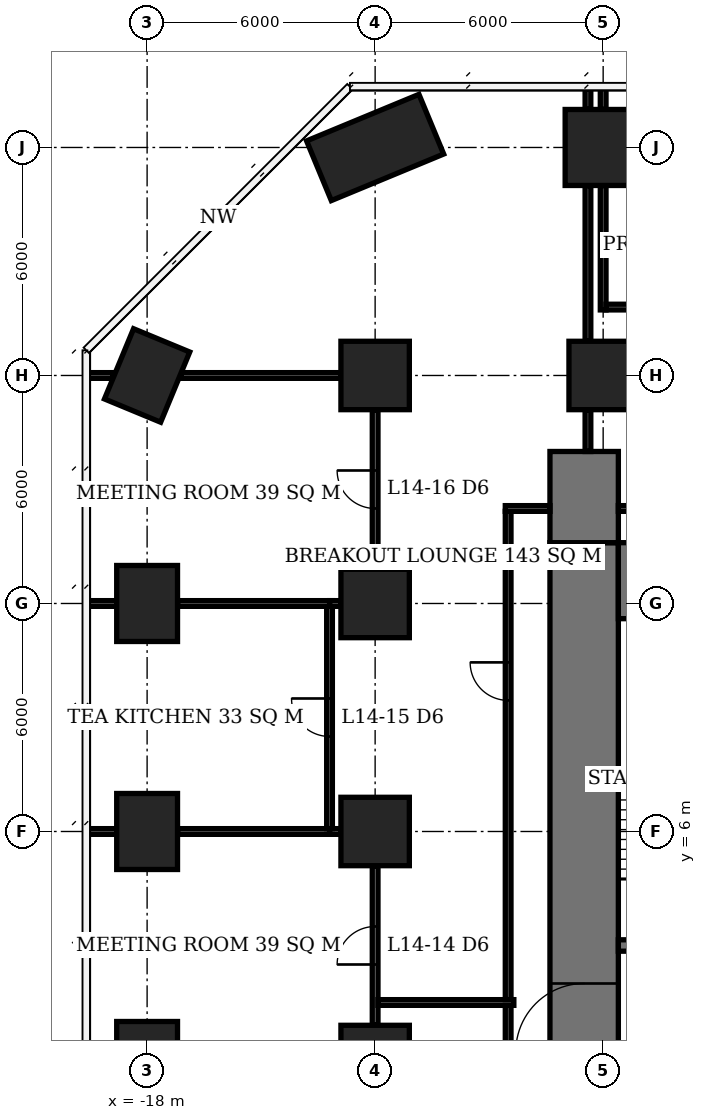
"""IFC4 building model, lengths in metres.
Left out: names, types, materials, properties, quantities, classifications, styles, units other than length and angle.
Written with IfcOpenShell. Run it as: python <this file> out.ifc"""

import sys

from ifc_helpers import new_model, si_unit, direction, frame, frame_2d, origin, origin_2d, place, context, subcontext, project, spatial, rectangle, extrude, element, fill, save


model = new_model("IFC4")
c1 = context("Model", 3, precision=1e-05, world=origin(), true_north=direction((0.0, 1.0)))
c2 = subcontext(c1, "Body", "Model", "MODEL_VIEW")
j1 = project(units=[si_unit("LENGTHUNIT", "METRE"), si_unit("PLANEANGLEUNIT", "RADIAN")], contexts=[c1])
p1 = place(None, origin())
s1 = spatial("IfcSite", under=j1, at=p1, CompositionType="ELEMENT")
p2 = place(p1, origin())
s2 = spatial("IfcBuilding", under=s1, at=p2, CompositionType="ELEMENT")
p3 = place(p2, frame((0.0, 0.0, 61.1)))
s3 = spatial("IfcBuildingStorey", under=s2, at=p3, CompositionType="ELEMENT", Elevation=61.1)
for number, where, z_axis, x_axis in (
    (1, (-18.0, 0.0, 0.0), (0.0, 0.0, 1.0), (0.0, 1.0, 0.0)),
    (2, (-18.0, 6.0, 0.0), (0.0, 0.0, 1.0), (0.0, 1.0, 0.0)),
    (3, (-18.0, 12.0, 0.0), (0.0, 0.0, 1.0), (0.0, 1.0, 0.0)),
    (4, (-18.0, 18.0, 0.0), (0.0, 0.0, 1.0), (0.383, 0.924, 0.0)),
):
    element("IfcColumn", number, at=place(p3, frame(where, z_axis=z_axis, x_axis=x_axis)), inside=s3, PredefinedType="COLUMN", context=c2, shape_type="SweptSolid", body=[
        extrude(rectangle(XDim=2.0, YDim=1.6, at=origin_2d()), origin(), (0.0, 0.0, 1.0), 3.9),
    ])
for number, where, z_axis, x_axis in (
    (5, (-12.0, 0.0, 0.0), (0.0, 0.0, 1.0), (1.0, 0.0, 0.0)),
    (6, (-12.0, 6.0, 0.0), (0.0, 0.0, 1.0), (1.0, 0.0, 0.0)),
    (7, (-12.0, 12.0, 0.0), (0.0, 0.0, 1.0), (1.0, 0.0, 0.0)),
    (8, (-12.0, 18.0, 0.0), (0.0, 0.0, 1.0), (1.0, 0.0, 0.0)),
):
    element("IfcColumn", number, at=place(p3, frame(where, z_axis=z_axis, x_axis=x_axis)), inside=s3, PredefinedType="COLUMN", context=c2, shape_type="SweptSolid", body=[
        extrude(rectangle(XDim=1.8, YDim=1.8, at=origin_2d()), origin(), (0.0, 0.0, 1.0), 3.9),
    ])
p4 = place(p3, frame((-12.0, 24.0, 0.0), z_axis=(0.0, 0.0, 1.0), x_axis=(0.923879532511, 0.382683432365, 0.0)))
e9 = element("IfcColumn", 9, at=p4, inside=s3, PredefinedType="COLUMN", context=c2, shape_type="SweptSolid", body=[
    extrude(rectangle(XDim=3.2, YDim=1.7, at=origin_2d()), origin(), (0.0, 0.0, 1.0), 3.9),
])
p5 = place(p3, frame((-6.0, 18.0, 0.0), z_axis=(0.0, 0.0, 1.0), x_axis=(1.0, 0.0, 0.0)))
e10 = element("IfcColumn", 10, at=p5, inside=s3, PredefinedType="COLUMN", context=c2, shape_type="SweptSolid", body=[
    extrude(rectangle(XDim=1.8, YDim=1.8, at=origin_2d()), origin(), (0.0, 0.0, 1.0), 3.9),
])
p6 = place(p3, frame((-6.0, 24.0, 0.0), z_axis=(0.0, 0.0, 1.0), x_axis=(1.0, 0.0, 0.0)))
e11 = element("IfcColumn", 11, at=p6, inside=s3, PredefinedType="COLUMN", context=c2, shape_type="SweptSolid", body=[
    extrude(rectangle(XDim=2.0, YDim=2.0, at=origin_2d()), origin(), (0.0, 0.0, 1.0), 3.9),
])
p7 = place(p3, frame((-5.6, 12.6, 0.0), z_axis=(0.0, 0.0, 1.0), x_axis=(1.0, 0.0, 0.0)))
e12 = element("IfcWall", 12, at=p7, inside=s3, PredefinedType="SHEAR", context=c2, shape_type="SweptSolid", body=[
    extrude(rectangle(XDim=23.2, YDim=2.0, at=frame_2d((11.6, 0.0))), origin(), (0.0, 0.0, 1.0), 3.9),
])
p8 = place(p3, frame((-6.5, -7.6, 0.0), z_axis=(0.0, 0.0, 1.0), x_axis=(0.0, 1.0, 0.0)))
e13 = element("IfcWall", 13, at=p8, inside=s3, PredefinedType="SHEAR", context=c2, shape_type="SweptSolid", body=[
    extrude(rectangle(XDim=21.2, YDim=1.8, at=frame_2d((10.6, 0.0))), origin(), (0.0, 0.0, 1.0), 3.9),
])
p9 = place(p8, frame((7.8, 0.0, 0.0)))
e14 = element("IfcOpeningElement", 14, at=p9, cuts=e13, PredefinedType="OPENING", context=c2, shape_type="SweptSolid", body=[
    extrude(rectangle(XDim=1.8, YDim=2.4, at=frame_2d((0.9, 1.2))), frame((0.0, 0.91, 0.0), z_axis=(0.0, -1.0, 0.0), x_axis=(1.0, 0.0, 0.0)), (0.0, 0.0, 1.0), 1.82),
])
p10 = place(p3, frame((-6.5, 13.6, 0.0), z_axis=(0.0, 0.0, 1.0), x_axis=(0.0, 1.0, 0.0)))
e15 = element("IfcWall", 15, at=p10, inside=s3, PredefinedType="SHEAR", context=c2, shape_type="SweptSolid", body=[
    extrude(rectangle(XDim=2.4, YDim=1.8, at=frame_2d((1.2, 0.0))), origin(), (0.0, 0.0, 1.0), 3.9),
])
p11 = place(p3, frame((-5.6, 3.0, 0.0), z_axis=(0.0, 0.0, 1.0), x_axis=(1.0, 0.0, 0.0)))
e16 = element("IfcWall", 16, at=p11, inside=s3, PredefinedType="SHEAR", context=c2, shape_type="SweptSolid", body=[
    extrude(rectangle(XDim=5.45, YDim=0.3, at=frame_2d((2.725, 0.0))), origin(), (0.0, 0.0, 1.0), 3.9),
])
p12 = place(p11, frame((0.4, 0.0, 0.0)))
e17 = element("IfcOpeningElement", 17, at=p12, cuts=e16, PredefinedType="OPENING", context=c2, shape_type="SweptSolid", body=[
    extrude(rectangle(XDim=1.2, YDim=2.1, at=frame_2d((0.6, 1.05))), frame((0.0, 0.16, 0.0), z_axis=(0.0, -1.0, 0.0), x_axis=(1.0, 0.0, 0.0)), (0.0, 0.0, 1.0), 0.32),
])
p13 = place(p11, frame((3.95, 0.0, 0.0)))
e18 = element("IfcOpeningElement", 18, at=p13, cuts=e16, PredefinedType="OPENING", context=c2, shape_type="SweptSolid", body=[
    extrude(rectangle(XDim=0.9, YDim=2.1, at=frame_2d((0.45, 1.05))), frame((0.0, 0.16, 0.0), z_axis=(0.0, -1.0, 0.0), x_axis=(1.0, 0.0, 0.0)), (0.0, 0.0, 1.0), 0.32),
])
p14 = place(p3, frame((-19.6, 6.0, 0.0), z_axis=(0.0, 0.0, 1.0), x_axis=(1.0, 0.0, 0.0)))
e19 = element("IfcWall", 19, at=p14, inside=s3, PredefinedType="PARTITIONING", context=c2, shape_type="SweptSolid", body=[
    extrude(rectangle(XDim=0.8, YDim=0.15, at=frame_2d((0.4, 0.0))), origin(), (0.0, 0.0, 1.0), 3.65),
])
p15 = place(p3, frame((-17.2, 6.0, 0.0), z_axis=(0.0, 0.0, 1.0), x_axis=(1.0, 0.0, 0.0)))
e20 = element("IfcWall", 20, at=p15, inside=s3, PredefinedType="PARTITIONING", context=c2, shape_type="SweptSolid", body=[
    extrude(rectangle(XDim=4.075, YDim=0.15, at=frame_2d((2.038, 0.0))), origin(), (0.0, 0.0, 1.0), 3.65),
])
p16 = place(p3, frame((-13.2, 6.0, 0.0), z_axis=(0.0, 0.0, 1.0), x_axis=(1.0, 0.0, 0.0)))
e21 = element("IfcWall", 21, at=p16, inside=s3, PredefinedType="PARTITIONING", context=c2, shape_type="SweptSolid", body=[
    extrude(rectangle(XDim=0.3, YDim=0.15, at=frame_2d((0.15, 0.0))), origin(), (0.0, 0.0, 1.0), 3.65),
])
p17 = place(p3, frame((-19.6, 12.0, 0.0), z_axis=(0.0, 0.0, 1.0), x_axis=(1.0, 0.0, 0.0)))
e22 = element("IfcWall", 22, at=p17, inside=s3, PredefinedType="PARTITIONING", context=c2, shape_type="SweptSolid", body=[
    extrude(rectangle(XDim=0.8, YDim=0.15, at=frame_2d((0.4, 0.0))), origin(), (0.0, 0.0, 1.0), 3.65),
])
p18 = place(p3, frame((-17.2, 12.0, 0.0), z_axis=(0.0, 0.0, 1.0), x_axis=(1.0, 0.0, 0.0)))
e23 = element("IfcWall", 23, at=p18, inside=s3, PredefinedType="PARTITIONING", context=c2, shape_type="SweptSolid", body=[
    extrude(rectangle(XDim=4.075, YDim=0.15, at=frame_2d((2.038, 0.0))), origin(), (0.0, 0.0, 1.0), 3.65),
])
p19 = place(p3, frame((-13.2, 12.0, 0.0), z_axis=(0.0, 0.0, 1.0), x_axis=(1.0, 0.0, 0.0)))
e24 = element("IfcWall", 24, at=p19, inside=s3, PredefinedType="PARTITIONING", context=c2, shape_type="SweptSolid", body=[
    extrude(rectangle(XDim=0.3, YDim=0.15, at=frame_2d((0.15, 0.0))), origin(), (0.0, 0.0, 1.0), 3.65),
])
p20 = place(p3, frame((-19.6, 18.0, 0.0), z_axis=(0.0, 0.0, 1.0), x_axis=(1.0, 0.0, 0.0)))
e25 = element("IfcWall", 25, at=p20, inside=s3, PredefinedType="PARTITIONING", context=c2, shape_type="SweptSolid", body=[
    extrude(rectangle(XDim=0.703, YDim=0.15, at=frame_2d((0.352, 0.0))), origin(), (0.0, 0.0, 1.0), 3.65),
])
p21 = place(p3, frame((-17.103, 18.0, 0.0), z_axis=(0.0, 0.0, 1.0), x_axis=(1.0, 0.0, 0.0)))
e26 = element("IfcWall", 26, at=p21, inside=s3, PredefinedType="PARTITIONING", context=c2, shape_type="SweptSolid", body=[
    extrude(rectangle(XDim=4.203, YDim=0.15, at=frame_2d((2.102, 0.0))), origin(), (0.0, 0.0, 1.0), 3.65),
])
p22 = place(p3, frame((-5.925, 19.8, 0.0), z_axis=(0.0, 0.0, 1.0), x_axis=(1.0, 0.0, 0.0)))
e27 = element("IfcWall", 27, at=p22, inside=s3, PredefinedType="PARTITIONING", context=c2, shape_type="SweptSolid", body=[
    extrude(rectangle(XDim=5.85, YDim=0.15, at=frame_2d((2.925, 0.0))), origin(), (0.0, 0.0, 1.0), 3.65),
])
p23 = place(p22, frame((2.425, 0.0, 0.0)))
e28 = element("IfcOpeningElement", 28, at=p23, cuts=e27, PredefinedType="OPENING", context=c2, shape_type="SweptSolid", body=[
    extrude(rectangle(XDim=1.0, YDim=2.1, at=frame_2d((0.5, 1.05))), frame((0.0, 0.085, 0.0), z_axis=(0.0, -1.0, 0.0), x_axis=(1.0, 0.0, 0.0)), (0.0, 0.0, 1.0), 0.17),
])
p24 = place(p3, frame((-13.2, 6.075, 0.0), z_axis=(0.0, 0.0, 1.0), x_axis=(0.0, 1.0, 0.0)))
e29 = element("IfcWall", 29, at=p24, inside=s3, PredefinedType="PARTITIONING", context=c2, shape_type="SweptSolid", body=[
    extrude(rectangle(XDim=5.85, YDim=0.15, at=frame_2d((2.925, 0.0))), origin(), (0.0, 0.0, 1.0), 3.65),
])
p25 = place(p24, frame((2.425, 0.0, 0.0)))
e30 = element("IfcOpeningElement", 30, at=p25, cuts=e29, PredefinedType="OPENING", context=c2, shape_type="SweptSolid", body=[
    extrude(rectangle(XDim=1.0, YDim=2.1, at=frame_2d((0.5, 1.05))), frame((0.0, 0.085, 0.0), z_axis=(0.0, -1.0, 0.0), x_axis=(1.0, 0.0, 0.0)), (0.0, 0.0, 1.0), 0.17),
])
p26 = place(p3, frame((-12.0, 0.9, 0.0), z_axis=(0.0, 0.0, 1.0), x_axis=(0.0, 1.0, 0.0)))
e31 = element("IfcWall", 31, at=p26, inside=s3, PredefinedType="PARTITIONING", context=c2, shape_type="SweptSolid", body=[
    extrude(rectangle(XDim=4.2, YDim=0.15, at=frame_2d((2.1, 0.0))), origin(), (0.0, 0.0, 1.0), 3.65),
])
p27 = place(p26, frame((1.6, 0.0, 0.0)))
e32 = element("IfcOpeningElement", 32, at=p27, cuts=e31, PredefinedType="OPENING", context=c2, shape_type="SweptSolid", body=[
    extrude(rectangle(XDim=1.0, YDim=2.1, at=frame_2d((0.5, 1.05))), frame((0.0, 0.085, 0.0), z_axis=(0.0, -1.0, 0.0), x_axis=(1.0, 0.0, 0.0)), (0.0, 0.0, 1.0), 0.17),
])
p28 = place(p3, frame((-12.0, 12.9, 0.0), z_axis=(0.0, 0.0, 1.0), x_axis=(0.0, 1.0, 0.0)))
e33 = element("IfcWall", 33, at=p28, inside=s3, PredefinedType="PARTITIONING", context=c2, shape_type="SweptSolid", body=[
    extrude(rectangle(XDim=4.2, YDim=0.15, at=frame_2d((2.1, 0.0))), origin(), (0.0, 0.0, 1.0), 3.65),
])
p29 = place(p28, frame((1.6, 0.0, 0.0)))
e34 = element("IfcOpeningElement", 34, at=p29, cuts=e33, PredefinedType="OPENING", context=c2, shape_type="SweptSolid", body=[
    extrude(rectangle(XDim=1.0, YDim=2.1, at=frame_2d((0.5, 1.05))), frame((0.0, 0.085, 0.0), z_axis=(0.0, -1.0, 0.0), x_axis=(1.0, 0.0, 0.0)), (0.0, 0.0, 1.0), 0.17),
])
p30 = place(p3, frame((-6.0, 19.725, 0.0), z_axis=(0.0, 0.0, 1.0), x_axis=(0.0, 1.0, 0.0)))
e35 = element("IfcWall", 35, at=p30, inside=s3, PredefinedType="PARTITIONING", context=c2, shape_type="SweptSolid", body=[
    extrude(rectangle(XDim=3.275, YDim=0.15, at=frame_2d((1.637, 0.0))), origin(), (0.0, 0.0, 1.0), 3.65),
])
p31 = place(p3, frame((-6.0, 25.0, 0.0), z_axis=(0.0, 0.0, 1.0), x_axis=(0.0, 1.0, 0.0)))
e36 = element("IfcWall", 36, at=p31, inside=s3, PredefinedType="PARTITIONING", context=c2, shape_type="SweptSolid", body=[
    extrude(rectangle(XDim=0.6, YDim=0.15, at=frame_2d((0.3, 0.0))), origin(), (0.0, 0.0, 1.0), 2.65),
])
p32 = place(p3, frame((-11.925, 1.5, 0.0), z_axis=(0.0, 0.0, 1.0), x_axis=(1.0, 0.0, 0.0)))
e37 = element("IfcWall", 37, at=p32, inside=s3, PredefinedType="PARTITIONING", context=c2, shape_type="SweptSolid", body=[
    extrude(rectangle(XDim=3.575, YDim=0.15, at=frame_2d((1.788, 0.0))), origin(), (0.0, 0.0, 1.0), 3.65),
])
p33 = place(p3, frame((-8.5, -8.425, 0.0), z_axis=(0.0, 0.0, 1.0), x_axis=(0.0, 1.0, 0.0)))
e38 = element("IfcWall", 38, at=p33, inside=s3, PredefinedType="PARTITIONING", context=c2, shape_type="SweptSolid", body=[
    extrude(rectangle(XDim=9.85, YDim=0.15, at=frame_2d((4.925, 0.0))), origin(), (0.0, 0.0, 1.0), 3.65),
])
p34 = place(p33, frame((2.925, 0.0, 0.0)))
e39 = element("IfcOpeningElement", 39, at=p34, cuts=e38, PredefinedType="OPENING", context=c2, shape_type="SweptSolid", body=[
    extrude(rectangle(XDim=1.0, YDim=2.1, at=frame_2d((0.5, 1.05))), frame((0.0, 0.085, 0.0), z_axis=(0.0, -1.0, 0.0), x_axis=(1.0, 0.0, 0.0)), (0.0, 0.0, 1.0), 0.17),
])
p35 = place(p3, frame((-8.5, 1.575, 0.0), z_axis=(0.0, 0.0, 1.0), x_axis=(0.0, 1.0, 0.0)))
e40 = element("IfcWall", 40, at=p35, inside=s3, PredefinedType="PARTITIONING", context=c2, shape_type="SweptSolid", body=[
    extrude(rectangle(XDim=12.85, YDim=0.15, at=frame_2d((6.425, 0.0))), origin(), (0.0, 0.0, 1.0), 3.65),
])
p36 = place(p35, frame((7.875, 0.0, 0.0)))
e41 = element("IfcOpeningElement", 41, at=p36, cuts=e40, PredefinedType="OPENING", context=c2, shape_type="SweptSolid", body=[
    extrude(rectangle(XDim=1.0, YDim=2.1, at=frame_2d((0.5, 1.05))), frame((0.0, 0.085, 0.0), z_axis=(0.0, -1.0, 0.0), x_axis=(1.0, 0.0, 0.0)), (0.0, 0.0, 1.0), 0.17),
])
p37 = place(p3, frame((-8.575, 14.5, 0.0), z_axis=(0.0, 0.0, 1.0), x_axis=(1.0, 0.0, 0.0)))
e42 = element("IfcWall", 42, at=p37, inside=s3, PredefinedType="PARTITIONING", context=c2, shape_type="SweptSolid", body=[
    extrude(rectangle(XDim=1.175, YDim=0.15, at=frame_2d((0.587, 0.0))), origin(), (0.0, 0.0, 1.0), 3.65),
])
p38 = place(p3, frame((-6.4, 16.0, 0.0), z_axis=(0.0, 0.0, 1.0), x_axis=(0.0, 1.0, 0.0)))
e43 = element("IfcWall", 43, at=p38, inside=s3, PredefinedType="PARTITIONING", context=c2, shape_type="SweptSolid", body=[
    extrude(rectangle(XDim=1.1, YDim=0.15, at=frame_2d((0.55, 0.0))), origin(), (0.0, 0.0, 1.0), 3.65),
])
p39 = place(p3, frame((-6.4, 18.9, 0.0), z_axis=(0.0, 0.0, 1.0), x_axis=(0.0, 1.0, 0.0)))
e44 = element("IfcWall", 44, at=p39, inside=s3, PredefinedType="PARTITIONING", context=c2, shape_type="SweptSolid", body=[
    extrude(rectangle(XDim=4.1, YDim=0.15, at=frame_2d((2.05, 0.0))), origin(), (0.0, 0.0, 1.0), 3.65),
])
p40 = place(p3, frame((-6.4, 25.0, 0.0), z_axis=(0.0, 0.0, 1.0), x_axis=(0.0, 1.0, 0.0)))
e45 = element("IfcWall", 45, at=p40, inside=s3, PredefinedType="PARTITIONING", context=c2, shape_type="SweptSolid", body=[
    extrude(rectangle(XDim=0.55, YDim=0.15, at=frame_2d((0.275, 0.0))), origin(), (0.0, 0.0, 1.0), 2.65),
])
p41 = place(p3, frame((-5.6, 14.5, 0.0), z_axis=(0.0, 0.0, 1.0), x_axis=(1.0, 0.0, 0.0)))
e46 = element("IfcWall", 46, at=p41, inside=s3, PredefinedType="PARTITIONING", context=c2, shape_type="SweptSolid", body=[
    extrude(rectangle(XDim=23.2, YDim=0.15, at=frame_2d((11.6, 0.0))), origin(), (0.0, 0.0, 1.0), 3.65),
])
p42 = place(p41, frame((14.58, 0.0, 0.0)))
e47 = element("IfcOpeningElement", 47, at=p42, cuts=e46, PredefinedType="OPENING", context=c2, shape_type="SweptSolid", body=[
    extrude(rectangle(XDim=1.0, YDim=2.1, at=frame_2d((0.5, 1.05))), frame((0.0, 0.085, 0.0), z_axis=(0.0, -1.0, 0.0), x_axis=(1.0, 0.0, 0.0)), (0.0, 0.0, 1.0), 0.17),
])
p43 = place(p9, origin())
e48 = element("IfcDoor", 48, at=p43, inside=s3, OperationType="DOUBLE_DOOR_SINGLE_SWING", PredefinedType="DOOR", context=c2, shape_type="SweptSolid", body=[
    extrude(rectangle(XDim=1.8, YDim=2.4, at=frame_2d((0.9, 1.2))), frame((0.0, 0.025, 0.0), z_axis=(0.0, -1.0, 0.0), x_axis=(1.0, 0.0, 0.0)), (0.0, 0.0, 1.0), 0.05),
])
fill(e14, e48)
p44 = place(p27, origin())
e49 = element("IfcDoor", 49, at=p44, inside=s3, OperationType="SINGLE_SWING_LEFT", PredefinedType="DOOR", context=c2, shape_type="SweptSolid", body=[
    extrude(rectangle(XDim=1.0, YDim=2.1, at=frame_2d((0.5, 1.05))), frame((0.0, 0.025, 0.0), z_axis=(0.0, -1.0, 0.0), x_axis=(1.0, 0.0, 0.0)), (0.0, 0.0, 1.0), 0.05),
])
fill(e32, e49)
p45 = place(p25, origin())
e50 = element("IfcDoor", 50, at=p45, inside=s3, OperationType="SINGLE_SWING_RIGHT", PredefinedType="DOOR", context=c2, shape_type="SweptSolid", body=[
    extrude(rectangle(XDim=1.0, YDim=2.1, at=frame_2d((0.5, 1.05))), frame((0.0, 0.025, 0.0), z_axis=(0.0, -1.0, 0.0), x_axis=(1.0, 0.0, 0.0)), (0.0, 0.0, 1.0), 0.05),
])
fill(e30, e50)
p46 = place(p29, origin())
e51 = element("IfcDoor", 51, at=p46, inside=s3, OperationType="SINGLE_SWING_RIGHT", PredefinedType="DOOR", context=c2, shape_type="SweptSolid", body=[
    extrude(rectangle(XDim=1.0, YDim=2.1, at=frame_2d((0.5, 1.05))), frame((0.0, 0.025, 0.0), z_axis=(0.0, -1.0, 0.0), x_axis=(1.0, 0.0, 0.0)), (0.0, 0.0, 1.0), 0.05),
])
fill(e34, e51)
p47 = place(p36, origin())
e52 = element("IfcDoor", 52, at=p47, inside=s3, OperationType="SINGLE_SWING_RIGHT", PredefinedType="DOOR", context=c2, shape_type="SweptSolid", body=[
    extrude(rectangle(XDim=1.0, YDim=2.1, at=frame_2d((0.5, 1.05))), frame((0.0, 0.025, 0.0), z_axis=(0.0, -1.0, 0.0), x_axis=(1.0, 0.0, 0.0)), (0.0, 0.0, 1.0), 0.05),
])
fill(e41, e52)
save(model, sys.argv[1])
